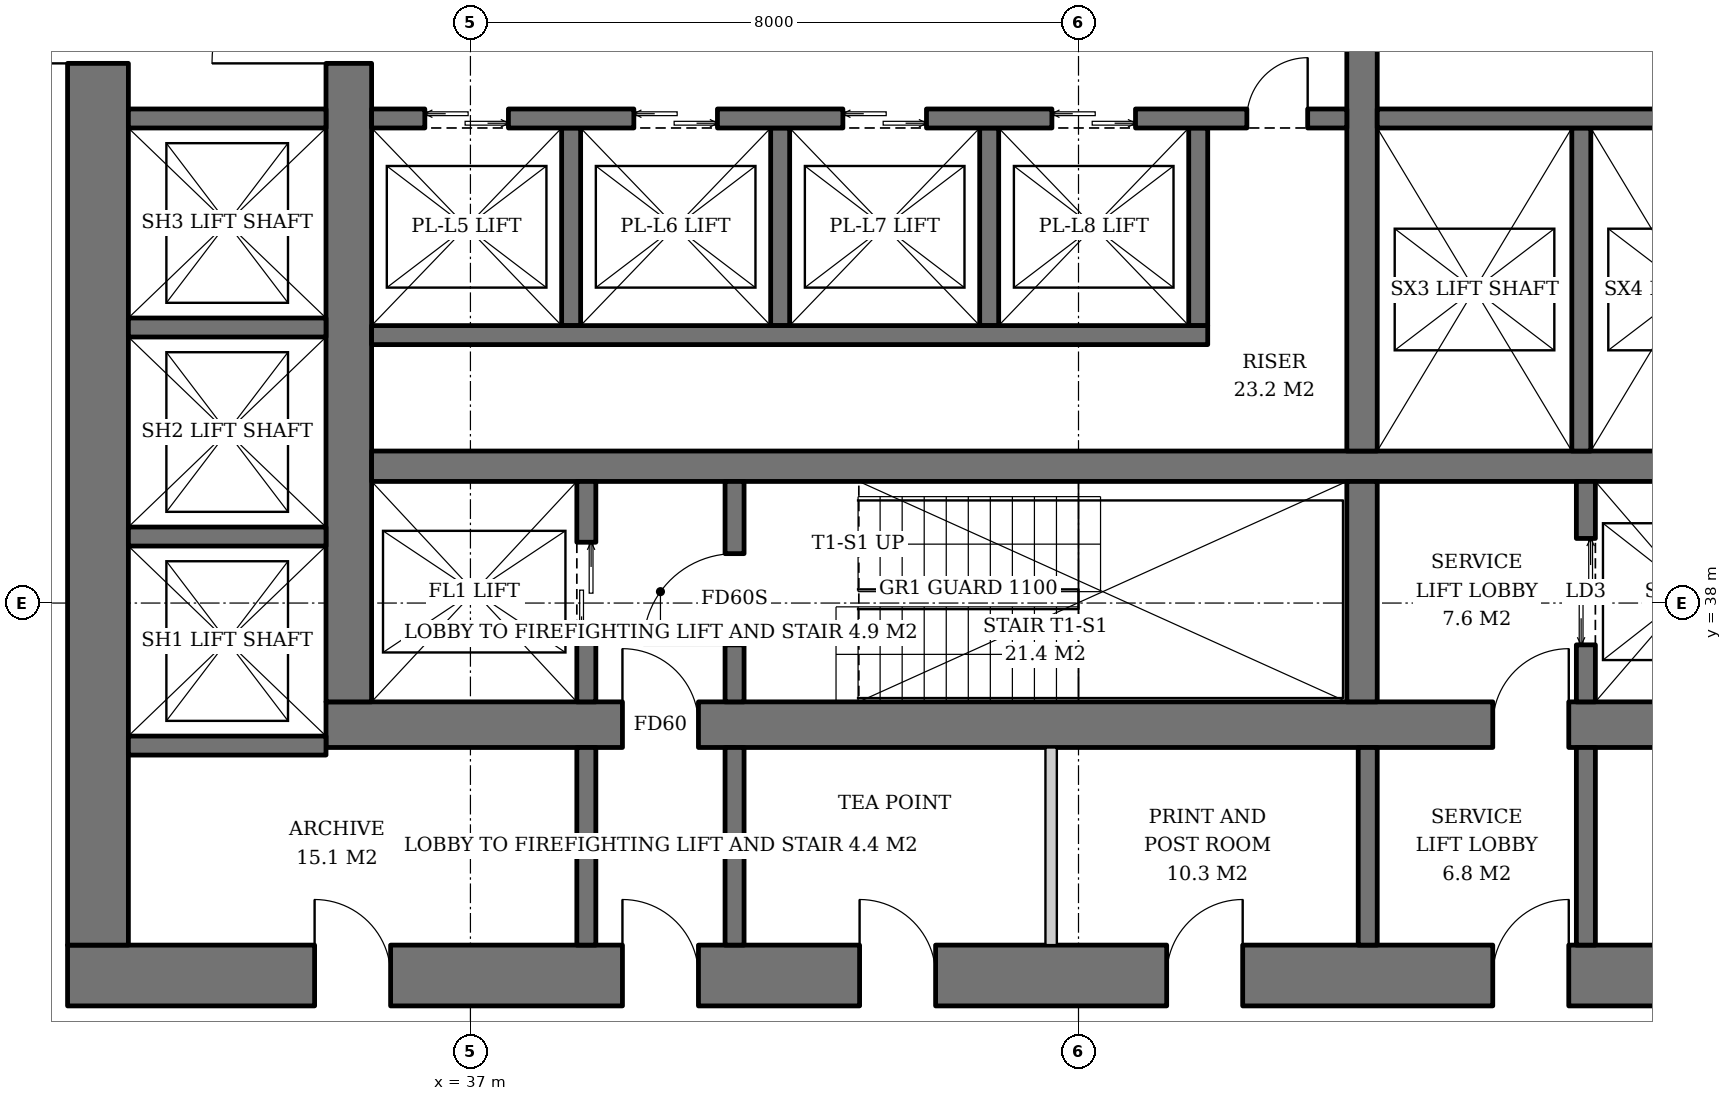
"""IFC4 building model, lengths in metres.
Left out: names, types, materials, properties, quantities, classifications, styles, units other than length and angle.
Written with IfcOpenShell. Run it as: python <this file> out.ifc"""

import sys

from ifc_helpers import new_model, si_unit, direction, frame, frame_2d, origin, place, context, subcontext, project, spatial, rectangle, extrude, element, fill, save


model = new_model("IFC4")
c1 = context("Model", 3, precision=1e-05, world=origin(), true_north=direction((0.0, 1.0)))
c2 = subcontext(c1, "Body", "Model", "MODEL_VIEW")
j1 = project(units=[si_unit("LENGTHUNIT", "METRE"), si_unit("PLANEANGLEUNIT", "RADIAN")], contexts=[c1])
p1 = place(None, origin())
s1 = spatial("IfcSite", under=j1, at=p1, CompositionType="ELEMENT")
p2 = place(p1, origin())
s2 = spatial("IfcBuilding", under=s1, at=p2, CompositionType="ELEMENT")
p3 = place(p2, frame((0.0, 0.0, 21.0)))
s3 = spatial("IfcBuildingStorey", under=s2, at=p3, CompositionType="ELEMENT", Elevation=21.0)
p4 = place(p3, frame((35.1, 36.4, 0.0), z_axis=(0.0, 0.0, 1.0), x_axis=(1.0, 0.0, 0.0)))
e1 = element("IfcWall", 1, at=p4, inside=s3, PredefinedType="SHEAR", context=c2, shape_type="SweptSolid", body=[
    extrude(rectangle(XDim=19.8, YDim=0.6, at=frame_2d((9.9, 0.0))), origin(), (0.0, 0.0, 1.0), 3.8),
])
p5 = place(p4, frame((3.9, 0.0, 0.0)))
e2 = element("IfcOpeningElement", 2, at=p5, cuts=e1, PredefinedType="OPENING", context=c2, shape_type="SweptSolid", body=[
    extrude(rectangle(XDim=1.0, YDim=2.1, at=frame_2d((0.5, 1.05))), frame((0.0, 0.31, 0.0), z_axis=(0.0, -1.0, 0.0), x_axis=(1.0, 0.0, 0.0)), (0.0, 0.0, 1.0), 0.62),
])
p6 = place(p4, frame((15.35, 0.0, 0.0)))
e3 = element("IfcOpeningElement", 3, at=p6, cuts=e1, PredefinedType="OPENING", context=c2, shape_type="SweptSolid", body=[
    extrude(rectangle(XDim=1.0, YDim=2.1, at=frame_2d((0.5, 1.05))), frame((0.0, 0.31, 0.0), z_axis=(0.0, -1.0, 0.0), x_axis=(1.0, 0.0, 0.0)), (0.0, 0.0, 1.0), 0.62),
])
p7 = place(p3, frame((35.4, 36.7, 0.0), z_axis=(0.0, 0.0, 1.0), x_axis=(0.0, 1.0, 0.0)))
e4 = element("IfcWall", 4, at=p7, inside=s3, PredefinedType="SHEAR", context=c2, shape_type="SweptSolid", body=[
    extrude(rectangle(XDim=18.6, YDim=0.6, at=frame_2d((9.3, 0.0))), origin(), (0.0, 0.0, 1.0), 3.8),
])
p8 = place(p7, frame((8.4, 0.0, 0.0)))
e5 = element("IfcOpeningElement", 5, at=p8, cuts=e4, PredefinedType="OPENING", context=c2, shape_type="SweptSolid", body=[
    extrude(rectangle(XDim=1.8, YDim=2.4, at=frame_2d((0.9, 1.2))), frame((0.0, 0.31, 0.0), z_axis=(0.0, -1.0, 0.0), x_axis=(1.0, 0.0, 0.0)), (0.0, 0.0, 1.0), 0.62),
])
p9 = place(p3, frame((31.7, 33.1, 0.0), z_axis=(0.0, 0.0, 1.0), x_axis=(1.0, 0.0, 0.0)))
e6 = element("IfcWall", 6, at=p9, inside=s3, PredefinedType="SHEAR", context=c2, shape_type="SweptSolid", body=[
    extrude(rectangle(XDim=26.6, YDim=0.8, at=frame_2d((13.3, 0.0))), origin(), (0.0, 0.0, 1.0), 3.8),
])
p10 = place(p9, frame((7.3, 0.0, 0.0)))
e7 = element("IfcOpeningElement", 7, at=p10, cuts=e6, PredefinedType="OPENING", context=c2, shape_type="SweptSolid", body=[
    extrude(rectangle(XDim=1.0, YDim=2.1, at=frame_2d((0.5, 1.05))), frame((0.0, 0.41, 0.0), z_axis=(0.0, -1.0, 0.0), x_axis=(1.0, 0.0, 0.0)), (0.0, 0.0, 1.0), 0.82),
])
p11 = place(p9, frame((18.75, 0.0, 0.0)))
e8 = element("IfcOpeningElement", 8, at=p11, cuts=e6, PredefinedType="OPENING", context=c2, shape_type="SweptSolid", body=[
    extrude(rectangle(XDim=1.0, YDim=2.1, at=frame_2d((0.5, 1.05))), frame((0.0, 0.41, 0.0), z_axis=(0.0, -1.0, 0.0), x_axis=(1.0, 0.0, 0.0)), (0.0, 0.0, 1.0), 0.82),
])
p12 = place(p9, frame((3.25, 0.0, 0.0)))
e9 = element("IfcOpeningElement", 9, at=p12, cuts=e6, PredefinedType="OPENING", context=c2, shape_type="SweptSolid", body=[
    extrude(rectangle(XDim=1.0, YDim=2.1, at=frame_2d((0.5, 1.05))), frame((0.0, 0.41, 0.0), z_axis=(0.0, -1.0, 0.0), x_axis=(1.0, 0.0, 0.0)), (0.0, 0.0, 1.0), 0.82),
])
p13 = place(p9, frame((10.42, 0.0, 0.0)))
e10 = element("IfcOpeningElement", 10, at=p13, cuts=e6, PredefinedType="OPENING", context=c2, shape_type="SweptSolid", body=[
    extrude(rectangle(XDim=1.0, YDim=2.1, at=frame_2d((0.5, 1.05))), frame((0.0, 0.41, 0.0), z_axis=(0.0, -1.0, 0.0), x_axis=(1.0, 0.0, 0.0)), (0.0, 0.0, 1.0), 0.82),
])
p14 = place(p9, frame((14.46, 0.0, 0.0)))
e11 = element("IfcOpeningElement", 11, at=p14, cuts=e6, PredefinedType="OPENING", context=c2, shape_type="SweptSolid", body=[
    extrude(rectangle(XDim=1.0, YDim=2.1, at=frame_2d((0.5, 1.05))), frame((0.0, 0.41, 0.0), z_axis=(0.0, -1.0, 0.0), x_axis=(1.0, 0.0, 0.0)), (0.0, 0.0, 1.0), 0.82),
])
p15 = place(p9, frame((22.45, 0.0, 0.0)))
e12 = element("IfcOpeningElement", 12, at=p15, cuts=e6, PredefinedType="OPENING", context=c2, shape_type="SweptSolid", body=[
    extrude(rectangle(XDim=1.0, YDim=2.1, at=frame_2d((0.5, 1.05))), frame((0.0, 0.41, 0.0), z_axis=(0.0, -1.0, 0.0), x_axis=(1.0, 0.0, 0.0)), (0.0, 0.0, 1.0), 0.82),
])
p16 = place(p3, frame((32.1, 33.5, 0.0), z_axis=(0.0, 0.0, 1.0), x_axis=(0.0, 1.0, 0.0)))
e13 = element("IfcWall", 13, at=p16, inside=s3, PredefinedType="SHEAR", context=c2, shape_type="SweptSolid", body=[
    extrude(rectangle(XDim=25.0, YDim=0.8, at=frame_2d((12.5, 0.0))), origin(), (0.0, 0.0, 1.0), 3.8),
])
p17 = place(p16, frame((11.6, 0.0, 0.0)))
e14 = element("IfcOpeningElement", 14, at=p17, cuts=e13, PredefinedType="OPENING", context=c2, shape_type="SweptSolid", body=[
    extrude(rectangle(XDim=1.8, YDim=2.4, at=frame_2d((0.9, 1.2))), frame((0.0, 0.41, 0.0), z_axis=(0.0, -1.0, 0.0), x_axis=(1.0, 0.0, 0.0)), (0.0, 0.0, 1.0), 0.82),
])
p18 = place(p3, frame((35.7, 39.8, 0.0), z_axis=(0.0, 0.0, 1.0), x_axis=(1.0, 0.0, 0.0)))
e15 = element("IfcWall", 15, at=p18, inside=s3, PredefinedType="SHEAR", context=c2, shape_type="SweptSolid", body=[
    extrude(rectangle(XDim=18.6, YDim=0.4, at=frame_2d((9.3, 0.0))), origin(), (0.0, 0.0, 1.0), 3.8),
])
p19 = place(p3, frame((48.73, 36.7, 0.0), z_axis=(0.0, 0.0, 1.0), x_axis=(0.0, 1.0, 0.0)))
e16 = element("IfcWall", 16, at=p19, inside=s3, PredefinedType="SHEAR", context=c2, shape_type="SweptSolid", body=[
    extrude(rectangle(XDim=2.9, YDim=0.4, at=frame_2d((1.45, 0.0))), origin(), (0.0, 0.0, 1.0), 3.8),
])
p20 = place(p3, frame((48.73, 40.0, 0.0), z_axis=(0.0, 0.0, 1.0), x_axis=(0.0, 1.0, 0.0)))
e17 = element("IfcWall", 17, at=p20, inside=s3, PredefinedType="SHEAR", context=c2, shape_type="SweptSolid", body=[
    extrude(rectangle(XDim=12.0, YDim=0.4, at=frame_2d((6.0, 0.0))), origin(), (0.0, 0.0, 1.0), 3.8),
])
p21 = place(p3, frame((38.525, 36.7, 0.0), z_axis=(0.0, 0.0, 1.0), x_axis=(0.0, 1.0, 0.0)))
e18 = element("IfcWall", 18, at=p21, inside=s3, PredefinedType="SHEAR", context=c2, shape_type="SweptSolid", body=[
    extrude(rectangle(XDim=2.9, YDim=0.25, at=frame_2d((1.45, 0.0))), origin(), (0.0, 0.0, 1.0), 3.8),
])
p22 = place(p21, frame((0.8, 0.0, 0.0)))
e19 = element("IfcOpeningElement", 19, at=p22, cuts=e18, PredefinedType="OPENING", context=c2, shape_type="SweptSolid", body=[
    extrude(rectangle(XDim=1.3, YDim=2.2, at=frame_2d((0.65, 1.1))), frame((0.0, 0.135, 0.0), z_axis=(0.0, -1.0, 0.0), x_axis=(1.0, 0.0, 0.0)), (0.0, 0.0, 1.0), 0.27),
])
p23 = place(p3, frame((40.475, 36.7, 0.0), z_axis=(0.0, 0.0, 1.0), x_axis=(0.0, 1.0, 0.0)))
e20 = element("IfcWall", 20, at=p23, inside=s3, PredefinedType="SHEAR", context=c2, shape_type="SweptSolid", body=[
    extrude(rectangle(XDim=2.9, YDim=0.25, at=frame_2d((1.45, 0.0))), origin(), (0.0, 0.0, 1.0), 3.8),
])
p24 = place(p23, frame((0.75, 0.0, 0.0)))
e21 = element("IfcOpeningElement", 21, at=p24, cuts=e20, PredefinedType="OPENING", context=c2, shape_type="SweptSolid", body=[
    extrude(rectangle(XDim=1.2, YDim=2.1, at=frame_2d((0.6, 1.05))), frame((0.0, 0.135, 0.0), z_axis=(0.0, -1.0, 0.0), x_axis=(1.0, 0.0, 0.0)), (0.0, 0.0, 1.0), 0.27),
])
p25 = place(p3, frame((51.675, 36.7, 0.0), z_axis=(0.0, 0.0, 1.0), x_axis=(0.0, 1.0, 0.0)))
e22 = element("IfcWall", 22, at=p25, inside=s3, PredefinedType="SHEAR", context=c2, shape_type="SweptSolid", body=[
    extrude(rectangle(XDim=2.9, YDim=0.25, at=frame_2d((1.45, 0.0))), origin(), (0.0, 0.0, 1.0), 3.8),
])
p26 = place(p25, frame((0.75, 0.0, 0.0)))
e23 = element("IfcOpeningElement", 23, at=p26, cuts=e22, PredefinedType="OPENING", context=c2, shape_type="SweptSolid", body=[
    extrude(rectangle(XDim=1.4, YDim=2.4, at=frame_2d((0.7, 1.2))), frame((0.0, 0.135, 0.0), z_axis=(0.0, -1.0, 0.0), x_axis=(1.0, 0.0, 0.0)), (0.0, 0.0, 1.0), 0.27),
])
for number, where, z_axis, x_axis in (
    (24, (38.325, 44.25, 0.0), (0.0, 0.0, 1.0), (0.0, -1.0, 0.0)),
    (25, (41.075, 44.25, 0.0), (0.0, 0.0, 1.0), (0.0, -1.0, 0.0)),
    (26, (43.825, 44.25, 0.0), (0.0, 0.0, 1.0), (0.0, -1.0, 0.0)),
    (27, (46.575, 44.25, 0.0), (0.0, 0.0, 1.0), (0.0, -1.0, 0.0)),
):
    element("IfcWall", number, at=place(p3, frame(where, z_axis=z_axis, x_axis=x_axis)), inside=s3, PredefinedType="SHEAR", context=c2, shape_type="SweptSolid", body=[
        extrude(rectangle(XDim=2.6, YDim=0.25, at=frame_2d((1.3, 0.0))), origin(), (0.0, 0.0, 1.0), 3.8),
    ])
p27 = place(p3, frame((35.7, 41.525, 0.0), z_axis=(0.0, 0.0, 1.0), x_axis=(1.0, 0.0, 0.0)))
e28 = element("IfcWall", 28, at=p27, inside=s3, PredefinedType="SHEAR", context=c2, shape_type="SweptSolid", body=[
    extrude(rectangle(XDim=11.0, YDim=0.25, at=frame_2d((5.5, 0.0))), origin(), (0.0, 0.0, 1.0), 3.8),
])
p28 = place(p3, frame((35.7, 44.375, 0.0), z_axis=(0.0, 0.0, 1.0), x_axis=(1.0, 0.0, 0.0)))
e29 = element("IfcWall", 29, at=p28, inside=s3, PredefinedType="SHEAR", context=c2, shape_type="SweptSolid", body=[
    extrude(rectangle(XDim=12.83, YDim=0.25, at=frame_2d((6.415, 0.0))), origin(), (0.0, 0.0, 1.0), 3.8),
])
p29 = place(p28, frame((0.7, 0.0, 0.0)))
e30 = element("IfcOpeningElement", 30, at=p29, cuts=e29, PredefinedType="OPENING", context=c2, shape_type="SweptSolid", body=[
    extrude(rectangle(XDim=1.1, YDim=2.2, at=frame_2d((0.55, 1.1))), frame((0.0, 0.135, 0.0), z_axis=(0.0, -1.0, 0.0), x_axis=(1.0, 0.0, 0.0)), (0.0, 0.0, 1.0), 0.27),
])
p30 = place(p28, frame((3.45, 0.0, 0.0)))
e31 = element("IfcOpeningElement", 31, at=p30, cuts=e29, PredefinedType="OPENING", context=c2, shape_type="SweptSolid", body=[
    extrude(rectangle(XDim=1.1, YDim=2.2, at=frame_2d((0.55, 1.1))), frame((0.0, 0.135, 0.0), z_axis=(0.0, -1.0, 0.0), x_axis=(1.0, 0.0, 0.0)), (0.0, 0.0, 1.0), 0.27),
])
p31 = place(p28, frame((6.2, 0.0, 0.0)))
e32 = element("IfcOpeningElement", 32, at=p31, cuts=e29, PredefinedType="OPENING", context=c2, shape_type="SweptSolid", body=[
    extrude(rectangle(XDim=1.1, YDim=2.2, at=frame_2d((0.55, 1.1))), frame((0.0, 0.135, 0.0), z_axis=(0.0, -1.0, 0.0), x_axis=(1.0, 0.0, 0.0)), (0.0, 0.0, 1.0), 0.27),
])
p32 = place(p28, frame((8.95, 0.0, 0.0)))
e33 = element("IfcOpeningElement", 33, at=p32, cuts=e29, PredefinedType="OPENING", context=c2, shape_type="SweptSolid", body=[
    extrude(rectangle(XDim=1.1, YDim=2.2, at=frame_2d((0.55, 1.1))), frame((0.0, 0.135, 0.0), z_axis=(0.0, -1.0, 0.0), x_axis=(1.0, 0.0, 0.0)), (0.0, 0.0, 1.0), 0.27),
])
p33 = place(p28, frame((11.515, 0.0, 0.0)))
e34 = element("IfcOpeningElement", 34, at=p33, cuts=e29, PredefinedType="OPENING", context=c2, shape_type="SweptSolid", body=[
    extrude(rectangle(XDim=0.8, YDim=2.0, at=frame_2d((0.4, 1.0))), frame((0.0, 0.135, 0.0), z_axis=(0.0, -1.0, 0.0), x_axis=(1.0, 0.0, 0.0)), (0.0, 0.0, 1.0), 0.27),
])
p34 = place(p3, frame((51.615, 44.25, 0.0), z_axis=(0.0, 0.0, 1.0), x_axis=(0.0, -1.0, 0.0)))
e35 = element("IfcWall", 35, at=p34, inside=s3, PredefinedType="SHEAR", context=c2, shape_type="SweptSolid", body=[
    extrude(rectangle(XDim=4.25, YDim=0.25, at=frame_2d((2.125, 0.0))), origin(), (0.0, 0.0, 1.0), 3.8),
])
p35 = place(p3, frame((48.93, 44.375, 0.0), z_axis=(0.0, 0.0, 1.0), x_axis=(1.0, 0.0, 0.0)))
e36 = element("IfcWall", 36, at=p35, inside=s3, PredefinedType="SHEAR", context=c2, shape_type="SweptSolid", body=[
    extrude(rectangle(XDim=5.37, YDim=0.25, at=frame_2d((2.685, 0.0))), origin(), (0.0, 0.0, 1.0), 3.8),
])
for number, where, z_axis, x_axis in (
    (37, (32.5, 36.125, 0.0), (0.0, 0.0, 1.0), (1.0, 0.0, 0.0)),
    (38, (32.5, 38.875, 0.0), (0.0, 0.0, 1.0), (1.0, 0.0, 0.0)),
    (39, (32.5, 41.625, 0.0), (0.0, 0.0, 1.0), (1.0, 0.0, 0.0)),
    (40, (32.5, 44.375, 0.0), (0.0, 0.0, 1.0), (1.0, 0.0, 0.0)),
):
    element("IfcWall", number, at=place(p3, frame(where, z_axis=z_axis, x_axis=x_axis)), inside=s3, PredefinedType="SHEAR", context=c2, shape_type="SweptSolid", body=[
        extrude(rectangle(XDim=2.6, YDim=0.25, at=frame_2d((1.3, 0.0))), origin(), (0.0, 0.0, 1.0), 3.8),
    ])
for number, where, z_axis, x_axis in (
    (41, (38.525, 33.5, 0.0), (0.0, 0.0, 1.0), (0.0, 1.0, 0.0)),
    (42, (40.475, 33.5, 0.0), (0.0, 0.0, 1.0), (0.0, 1.0, 0.0)),
    (43, (48.805, 33.5, 0.0), (0.0, 0.0, 1.0), (0.0, 1.0, 0.0)),
    (44, (51.675, 33.5, 0.0), (0.0, 0.0, 1.0), (0.0, 1.0, 0.0)),
):
    element("IfcWall", number, at=place(p3, frame(where, z_axis=z_axis, x_axis=x_axis)), inside=s3, PredefinedType="SOLIDWALL", context=c2, shape_type="SweptSolid", body=[
        extrude(rectangle(XDim=2.6, YDim=0.25, at=frame_2d((1.3, 0.0))), origin(), (0.0, 0.0, 1.0), 3.62),
    ])
p36 = place(p3, frame((44.64, 33.5, 0.0), z_axis=(0.0, 0.0, 1.0), x_axis=(0.0, 1.0, 0.0)))
e45 = element("IfcWall", 45, at=p36, inside=s3, PredefinedType="SOLIDWALL", context=c2, shape_type="SweptSolid", body=[
    extrude(rectangle(XDim=2.6, YDim=0.15, at=frame_2d((1.3, 0.0))), origin(), (0.0, 0.0, 1.0), 3.62),
])
p37 = place(p22, origin())
e46 = element("IfcDoor", 46, at=p37, inside=s3, OperationType="DOUBLE_DOOR_SLIDING", PredefinedType="DOOR", context=c2, shape_type="SweptSolid", body=[
    extrude(rectangle(XDim=1.3, YDim=2.2, at=frame_2d((0.65, 1.1))), frame((0.0, 0.025, 0.0), z_axis=(0.0, -1.0, 0.0), x_axis=(1.0, 0.0, 0.0)), (0.0, 0.0, 1.0), 0.05),
])
fill(e19, e46)
p38 = place(p24, origin())
e47 = element("IfcDoor", 47, at=p38, inside=s3, OperationType="SINGLE_SWING_LEFT", PredefinedType="DOOR", context=c2, shape_type="SweptSolid", body=[
    extrude(rectangle(XDim=1.2, YDim=2.1, at=frame_2d((0.6, 1.05))), frame((0.0, 0.025, 0.0), z_axis=(0.0, -1.0, 0.0), x_axis=(1.0, 0.0, 0.0)), (0.0, 0.0, 1.0), 0.05),
])
fill(e21, e47)
p39 = place(p26, origin())
e48 = element("IfcDoor", 48, at=p39, inside=s3, OperationType="DOUBLE_DOOR_SLIDING", PredefinedType="DOOR", context=c2, shape_type="SweptSolid", body=[
    extrude(rectangle(XDim=1.4, YDim=2.4, at=frame_2d((0.7, 1.2))), frame((0.0, 0.025, 0.0), z_axis=(0.0, -1.0, 0.0), x_axis=(1.0, 0.0, 0.0)), (0.0, 0.0, 1.0), 0.05),
])
fill(e23, e48)
p40 = place(p29, origin())
e49 = element("IfcDoor", 49, at=p40, inside=s3, OperationType="DOUBLE_DOOR_SLIDING", PredefinedType="DOOR", context=c2, shape_type="SweptSolid", body=[
    extrude(rectangle(XDim=1.1, YDim=2.2, at=frame_2d((0.55, 1.1))), frame((0.0, 0.025, 0.0), z_axis=(0.0, -1.0, 0.0), x_axis=(1.0, 0.0, 0.0)), (0.0, 0.0, 1.0), 0.05),
])
fill(e30, e49)
p41 = place(p30, origin())
e50 = element("IfcDoor", 50, at=p41, inside=s3, OperationType="DOUBLE_DOOR_SLIDING", PredefinedType="DOOR", context=c2, shape_type="SweptSolid", body=[
    extrude(rectangle(XDim=1.1, YDim=2.2, at=frame_2d((0.55, 1.1))), frame((0.0, 0.025, 0.0), z_axis=(0.0, -1.0, 0.0), x_axis=(1.0, 0.0, 0.0)), (0.0, 0.0, 1.0), 0.05),
])
fill(e31, e50)
p42 = place(p31, origin())
e51 = element("IfcDoor", 51, at=p42, inside=s3, OperationType="DOUBLE_DOOR_SLIDING", PredefinedType="DOOR", context=c2, shape_type="SweptSolid", body=[
    extrude(rectangle(XDim=1.1, YDim=2.2, at=frame_2d((0.55, 1.1))), frame((0.0, 0.025, 0.0), z_axis=(0.0, -1.0, 0.0), x_axis=(1.0, 0.0, 0.0)), (0.0, 0.0, 1.0), 0.05),
])
fill(e32, e51)
p43 = place(p32, origin())
e52 = element("IfcDoor", 52, at=p43, inside=s3, OperationType="DOUBLE_DOOR_SLIDING", PredefinedType="DOOR", context=c2, shape_type="SweptSolid", body=[
    extrude(rectangle(XDim=1.1, YDim=2.2, at=frame_2d((0.55, 1.1))), frame((0.0, 0.025, 0.0), z_axis=(0.0, -1.0, 0.0), x_axis=(1.0, 0.0, 0.0)), (0.0, 0.0, 1.0), 0.05),
])
fill(e33, e52)
p44 = place(p33, origin())
e53 = element("IfcDoor", 53, at=p44, inside=s3, OperationType="SINGLE_SWING_RIGHT", PredefinedType="DOOR", context=c2, shape_type="SweptSolid", body=[
    extrude(rectangle(XDim=0.8, YDim=2.0, at=frame_2d((0.4, 1.0))), frame((0.0, 0.025, 0.0), z_axis=(0.0, -1.0, 0.0), x_axis=(1.0, 0.0, 0.0)), (0.0, 0.0, 1.0), 0.05),
])
fill(e34, e53)
p45 = place(p5, origin())
e54 = element("IfcDoor", 54, at=p45, inside=s3, OperationType="SINGLE_SWING_LEFT", PredefinedType="DOOR", context=c2, shape_type="SweptSolid", body=[
    extrude(rectangle(XDim=1.0, YDim=2.1, at=frame_2d((0.5, 1.05))), frame((0.0, 0.025, 0.0), z_axis=(0.0, -1.0, 0.0), x_axis=(1.0, 0.0, 0.0)), (0.0, 0.0, 1.0), 0.05),
])
fill(e2, e54)
p46 = place(p8, origin())
e55 = element("IfcDoor", 55, at=p46, inside=s3, OperationType="DOUBLE_DOOR_SINGLE_SWING", PredefinedType="DOOR", context=c2, shape_type="SweptSolid", body=[
    extrude(rectangle(XDim=1.8, YDim=2.4, at=frame_2d((0.9, 1.2))), frame((0.0, 0.025, 0.0), z_axis=(0.0, -1.0, 0.0), x_axis=(1.0, 0.0, 0.0)), (0.0, 0.0, 1.0), 0.05),
])
fill(e5, e55)
p47 = place(p6, origin())
e56 = element("IfcDoor", 56, at=p47, inside=s3, OperationType="SINGLE_SWING_RIGHT", PredefinedType="DOOR", context=c2, shape_type="SweptSolid", body=[
    extrude(rectangle(XDim=1.0, YDim=2.1, at=frame_2d((0.5, 1.05))), frame((0.0, 0.025, 0.0), z_axis=(0.0, -1.0, 0.0), x_axis=(1.0, 0.0, 0.0)), (0.0, 0.0, 1.0), 0.05),
])
fill(e3, e56)
p48 = place(p17, origin())
e57 = element("IfcDoor", 57, at=p48, inside=s3, OperationType="DOUBLE_DOOR_SINGLE_SWING", PredefinedType="DOOR", context=c2, shape_type="SweptSolid", body=[
    extrude(rectangle(XDim=1.8, YDim=2.4, at=frame_2d((0.9, 1.2))), frame((0.0, 0.025, 0.0), z_axis=(0.0, -1.0, 0.0), x_axis=(1.0, 0.0, 0.0)), (0.0, 0.0, 1.0), 0.05),
])
fill(e14, e57)
p49 = place(p10, origin())
e58 = element("IfcDoor", 58, at=p49, inside=s3, OperationType="SINGLE_SWING_LEFT", PredefinedType="DOOR", context=c2, shape_type="SweptSolid", body=[
    extrude(rectangle(XDim=1.0, YDim=2.1, at=frame_2d((0.5, 1.05))), frame((0.0, 0.025, 0.0), z_axis=(0.0, -1.0, 0.0), x_axis=(1.0, 0.0, 0.0)), (0.0, 0.0, 1.0), 0.05),
])
fill(e7, e58)
p50 = place(p11, origin())
e59 = element("IfcDoor", 59, at=p50, inside=s3, OperationType="SINGLE_SWING_RIGHT", PredefinedType="DOOR", context=c2, shape_type="SweptSolid", body=[
    extrude(rectangle(XDim=1.0, YDim=2.1, at=frame_2d((0.5, 1.05))), frame((0.0, 0.025, 0.0), z_axis=(0.0, -1.0, 0.0), x_axis=(1.0, 0.0, 0.0)), (0.0, 0.0, 1.0), 0.05),
])
fill(e8, e59)
p51 = place(p12, origin())
e60 = element("IfcDoor", 60, at=p51, inside=s3, OperationType="SINGLE_SWING_LEFT", PredefinedType="DOOR", context=c2, shape_type="SweptSolid", body=[
    extrude(rectangle(XDim=1.0, YDim=2.1, at=frame_2d((0.5, 1.05))), frame((0.0, 0.39, 0.0), z_axis=(0.0, -1.0, 0.0), x_axis=(1.0, 0.0, 0.0)), (0.0, 0.0, 1.0), 0.05),
])
fill(e9, e60)
p52 = place(p13, origin())
e61 = element("IfcDoor", 61, at=p52, inside=s3, OperationType="SINGLE_SWING_LEFT", PredefinedType="DOOR", context=c2, shape_type="SweptSolid", body=[
    extrude(rectangle(XDim=1.0, YDim=2.1, at=frame_2d((0.5, 1.05))), frame((0.0, 0.39, 0.0), z_axis=(0.0, -1.0, 0.0), x_axis=(1.0, 0.0, 0.0)), (0.0, 0.0, 1.0), 0.05),
])
fill(e10, e61)
p53 = place(p14, origin())
e62 = element("IfcDoor", 62, at=p53, inside=s3, OperationType="SINGLE_SWING_RIGHT", PredefinedType="DOOR", context=c2, shape_type="SweptSolid", body=[
    extrude(rectangle(XDim=1.0, YDim=2.1, at=frame_2d((0.5, 1.05))), frame((0.0, 0.39, 0.0), z_axis=(0.0, -1.0, 0.0), x_axis=(1.0, 0.0, 0.0)), (0.0, 0.0, 1.0), 0.05),
])
fill(e11, e62)
save(model, sys.argv[1])
